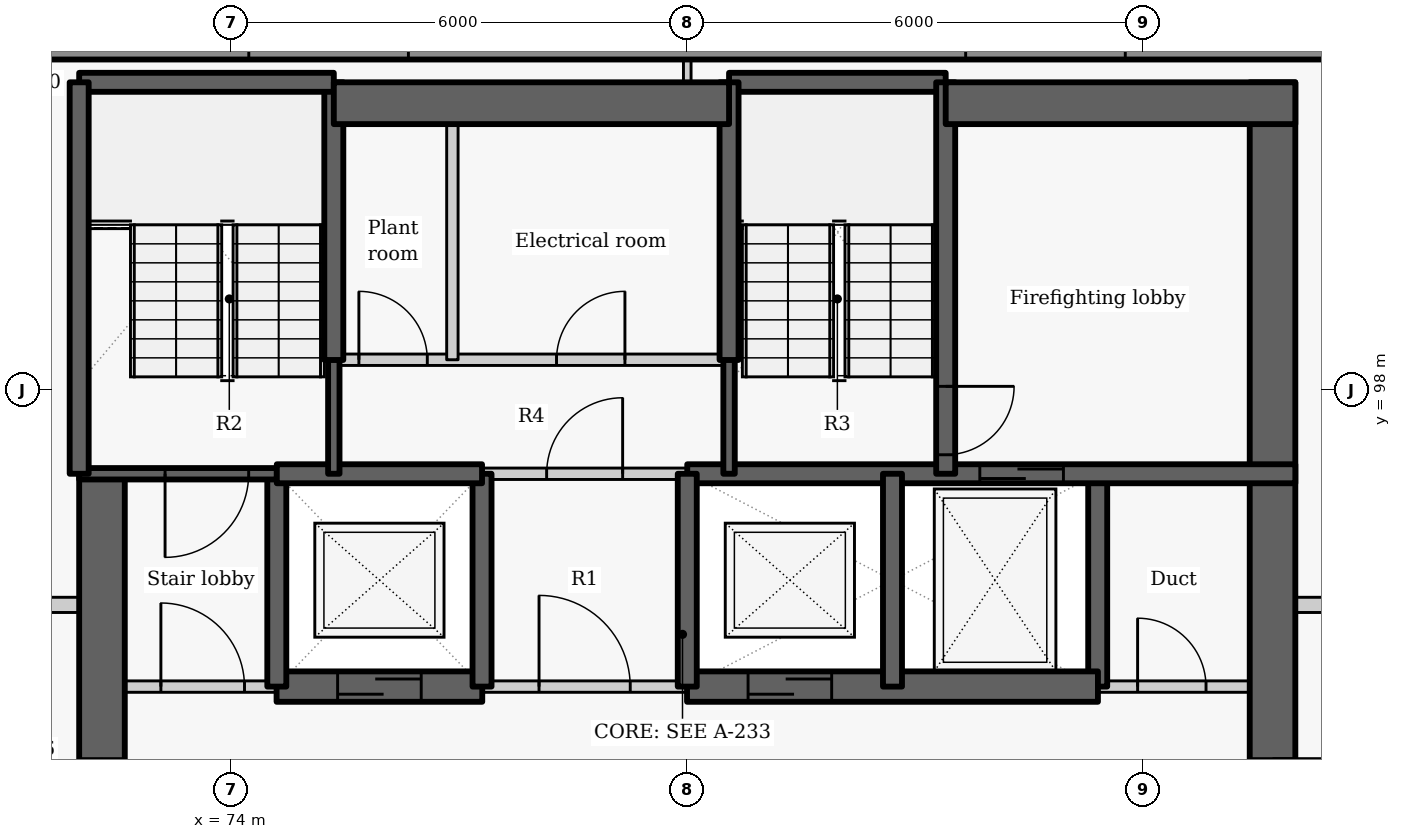
"""IFC4 building model, lengths in metres.
Left out: names, types, materials, properties, quantities, classifications, styles, units other than length and angle.
Written with IfcOpenShell. Run it as: python <this file> out.ifc"""

import sys

from ifc_helpers import new_model, si_unit, direction, frame, frame_2d, origin, place, context, subcontext, project, spatial, rectangle, extrude, element, fill, save


model = new_model("IFC4")
c1 = context("Model", 3, precision=1e-05, world=origin(), true_north=direction((0.0, 1.0)))
c2 = subcontext(c1, "Body", "Model", "MODEL_VIEW")
j1 = project(units=[si_unit("LENGTHUNIT", "METRE"), si_unit("PLANEANGLEUNIT", "RADIAN")], contexts=[c1])
p1 = place(None, origin())
s1 = spatial("IfcSite", under=j1, at=p1, CompositionType="ELEMENT")
p2 = place(p1, origin())
s2 = spatial("IfcBuilding", under=s1, at=p2, CompositionType="ELEMENT")
p3 = place(p2, frame((0.0, 0.0, 183.3)))
s3 = spatial("IfcBuildingStorey", under=s2, at=p3, CompositionType="ELEMENT", Elevation=183.3)
p4 = place(p3, frame((89.449, 102.5, 0.0), z_axis=(0.0, 0.0, 1.0), x_axis=(-1.0, 0.0, 0.0)))
e1 = element("IfcWall", 1, at=p4, inside=s3, PredefinedType="SOLIDWALL", context=c2, shape_type="SweptSolid", body=[
    extrude(rectangle(XDim=18.933, YDim=0.3, at=frame_2d((9.466, 0.0))), origin(), (0.0, 0.0, 1.0), 2.425),
])
p5 = place(p4, frame((3.687, 0.0, 0.9)))
e2 = element("IfcOpeningElement", 2, at=p5, cuts=e1, PredefinedType="OPENING", context=c2, shape_type="SweptSolid", body=[
    extrude(rectangle(XDim=2.1, YDim=1.1, at=frame_2d((1.05, 0.55))), frame((0.0, 0.16, 0.0), z_axis=(0.0, -1.0, 0.0), x_axis=(1.0, 0.0, 0.0)), (0.0, 0.0, 1.0), 0.32),
])
p6 = place(p4, frame((13.118, 0.0, 0.9)))
e3 = element("IfcOpeningElement", 3, at=p6, cuts=e1, PredefinedType="OPENING", context=c2, shape_type="SweptSolid", body=[
    extrude(rectangle(XDim=2.1, YDim=1.1, at=frame_2d((1.05, 0.55))), frame((0.0, 0.16, 0.0), z_axis=(0.0, -1.0, 0.0), x_axis=(1.0, 0.0, 0.0)), (0.0, 0.0, 1.0), 0.32),
])
p7 = place(p3, frame((72.3, 87.8, -0.275), z_axis=(0.0, 0.0, 1.0), x_axis=(0.0, 1.0, 0.0)))
e4 = element("IfcWall", 4, at=p7, inside=s3, PredefinedType="SHEAR", context=c2, shape_type="SweptSolid", body=[
    extrude(rectangle(XDim=9.1, YDim=0.6, at=frame_2d((4.55, 0.0))), origin(), (0.0, 0.0, 1.0), 3.3),
])
p8 = place(p7, frame((3.852, 0.0, 0.275)))
e5 = element("IfcOpeningElement", 5, at=p8, cuts=e4, PredefinedType="OPENING", context=c2, shape_type="SweptSolid", body=[
    extrude(rectangle(XDim=1.5, YDim=2.1, at=frame_2d((0.75, 1.05))), frame((0.0, 0.31, 0.0), z_axis=(0.0, -1.0, 0.0), x_axis=(1.0, 0.0, 0.0)), (0.0, 0.0, 1.0), 0.62),
])
p9 = place(p3, frame((85.4, 94.1, -0.275), z_axis=(0.0, 0.0, 1.0), x_axis=(0.0, 1.0, 0.0)))
e6 = element("IfcWall", 6, at=p9, inside=s3, PredefinedType="SHEAR", context=c2, shape_type="SweptSolid", body=[
    extrude(rectangle(XDim=2.8, YDim=0.25, at=frame_2d((1.4, 0.0))), origin(), (0.0, 0.0, 1.0), 3.3),
])
p10 = place(p3, frame((87.7, 102.05, -0.275), z_axis=(0.0, 0.0, 1.0), x_axis=(0.0, -1.0, 0.0)))
e7 = element("IfcWall", 7, at=p10, inside=s3, PredefinedType="SHEAR", context=c2, shape_type="SweptSolid", body=[
    extrude(rectangle(XDim=14.25, YDim=0.6, at=frame_2d((7.125, 0.0))), origin(), (0.0, 0.0, 1.0), 3.3),
])
p11 = place(p10, frame((8.898, 0.0, 0.275)))
e8 = element("IfcOpeningElement", 8, at=p11, cuts=e7, PredefinedType="OPENING", context=c2, shape_type="SweptSolid", body=[
    extrude(rectangle(XDim=1.5, YDim=2.1, at=frame_2d((0.75, 1.05))), frame((0.0, 0.31, 0.0), z_axis=(0.0, -1.0, 0.0), x_axis=(1.0, 0.0, 0.0)), (0.0, 0.0, 1.0), 0.62),
])
p12 = place(p3, frame((72.0, 94.1, 0.0), z_axis=(0.0, 0.0, 1.0), x_axis=(1.0, 0.0, 0.0)))
e9 = element("IfcWall", 9, at=p12, inside=s3, PredefinedType="PARTITIONING", context=c2, shape_type="SweptSolid", body=[
    extrude(rectangle(XDim=2.603, YDim=0.15, at=frame_2d((1.302, 0.0))), origin(), (0.0, 0.0, 1.0), 3.025),
])
p13 = place(p12, frame((1.075, 0.0, 0.0)))
e10 = element("IfcOpeningElement", 10, at=p13, cuts=e9, PredefinedType="OPENING", context=c2, shape_type="SweptSolid", body=[
    extrude(rectangle(XDim=1.1, YDim=2.1, at=frame_2d((0.55, 1.05))), frame((0.0, 0.085, 0.0), z_axis=(0.0, -1.0, 0.0), x_axis=(1.0, 0.0, 0.0)), (0.0, 0.0, 1.0), 0.17),
])
p14 = place(p3, frame((77.297, 94.1, 0.0), z_axis=(0.0, 0.0, 1.0), x_axis=(1.0, 0.0, 0.0)))
e11 = element("IfcWall", 11, at=p14, inside=s3, PredefinedType="PARTITIONING", context=c2, shape_type="SweptSolid", body=[
    extrude(rectangle(XDim=2.706, YDim=0.15, at=frame_2d((1.353, 0.0))), origin(), (0.0, 0.0, 1.0), 3.025),
])
p15 = place(p14, frame((0.753, 0.0, 0.0)))
e12 = element("IfcOpeningElement", 12, at=p15, cuts=e11, PredefinedType="OPENING", context=c2, shape_type="SweptSolid", body=[
    extrude(rectangle(XDim=1.2, YDim=2.1, at=frame_2d((0.6, 1.05))), frame((0.0, 0.085, 0.0), z_axis=(0.0, -1.0, 0.0), x_axis=(1.0, 0.0, 0.0)), (0.0, 0.0, 1.0), 0.17),
])
p16 = place(p3, frame((85.397, 94.1, 0.0), z_axis=(0.0, 0.0, 1.0), x_axis=(1.0, 0.0, 0.0)))
e13 = element("IfcWall", 13, at=p16, inside=s3, PredefinedType="PARTITIONING", context=c2, shape_type="SweptSolid", body=[
    extrude(rectangle(XDim=2.603, YDim=0.15, at=frame_2d((1.302, 0.0))), origin(), (0.0, 0.0, 1.0), 3.025),
])
p17 = place(p16, frame((0.528, 0.0, 0.0)))
e14 = element("IfcOpeningElement", 14, at=p17, cuts=e13, PredefinedType="OPENING", context=c2, shape_type="SweptSolid", body=[
    extrude(rectangle(XDim=0.9, YDim=2.1, at=frame_2d((0.45, 1.05))), frame((0.0, 0.085, 0.0), z_axis=(0.0, -1.0, 0.0), x_axis=(1.0, 0.0, 0.0)), (0.0, 0.0, 1.0), 0.17),
])
p18 = place(p3, frame((74.597, 94.1, -0.275), z_axis=(0.0, 0.0, 1.0), x_axis=(1.0, 0.0, 0.0)))
e15 = element("IfcWall", 15, at=p18, inside=s3, PredefinedType="SHEAR", context=c2, shape_type="SweptSolid", body=[
    extrude(rectangle(XDim=2.706, YDim=0.4, at=frame_2d((1.353, 0.0))), origin(), (0.0, 0.0, 1.0), 3.3),
])
p19 = place(p18, frame((0.803, 0.0, 0.275)))
e16 = element("IfcOpeningElement", 16, at=p19, cuts=e15, PredefinedType="OPENING", context=c2, shape_type="SweptSolid", body=[
    extrude(rectangle(XDim=1.1, YDim=2.1, at=frame_2d((0.55, 1.05))), frame((0.0, 0.21, 0.0), z_axis=(0.0, -1.0, 0.0), x_axis=(1.0, 0.0, 0.0)), (0.0, 0.0, 1.0), 0.42),
])
p20 = place(p3, frame((79.997, 94.1, -0.275), z_axis=(0.0, 0.0, 1.0), x_axis=(1.0, 0.0, 0.0)))
e17 = element("IfcWall", 17, at=p20, inside=s3, PredefinedType="SHEAR", context=c2, shape_type="SweptSolid", body=[
    extrude(rectangle(XDim=5.406, YDim=0.4, at=frame_2d((2.703, 0.0))), origin(), (0.0, 0.0, 1.0), 3.3),
])
p21 = place(p20, frame((0.803, 0.0, 0.275)))
e18 = element("IfcOpeningElement", 18, at=p21, cuts=e17, PredefinedType="OPENING", context=c2, shape_type="SweptSolid", body=[
    extrude(rectangle(XDim=1.1, YDim=2.1, at=frame_2d((0.55, 1.05))), frame((0.0, 0.21, 0.0), z_axis=(0.0, -1.0, 0.0), x_axis=(1.0, 0.0, 0.0)), (0.0, 0.0, 1.0), 0.42),
])
p22 = place(p3, frame((74.6, 94.1, -0.275), z_axis=(0.0, 0.0, 1.0), x_axis=(0.0, 1.0, 0.0)))
e19 = element("IfcWall", 19, at=p22, inside=s3, PredefinedType="SHEAR", context=c2, shape_type="SweptSolid", body=[
    extrude(rectangle(XDim=2.8, YDim=0.25, at=frame_2d((1.4, 0.0))), origin(), (0.0, 0.0, 1.0), 3.3),
])
p23 = place(p3, frame((74.6, 96.9, -0.275), z_axis=(0.0, 0.0, 1.0), x_axis=(-1.0, 0.0, 0.0)))
e20 = element("IfcWall", 20, at=p23, inside=s3, PredefinedType="SHEAR", context=c2, shape_type="SweptSolid", body=[
    extrude(rectangle(XDim=2.6, YDim=0.15, at=frame_2d((1.3, 0.0))), origin(), (0.0, 0.0, 1.0), 3.3),
])
p24 = place(p23, frame((0.37, 0.0, 0.275)))
e21 = element("IfcOpeningElement", 21, at=p24, cuts=e20, PredefinedType="OPENING", context=c2, shape_type="SweptSolid", body=[
    extrude(rectangle(XDim=1.1, YDim=2.1, at=frame_2d((0.55, 1.05))), frame((0.0, 0.085, 0.0), z_axis=(0.0, -1.0, 0.0), x_axis=(1.0, 0.0, 0.0)), (0.0, 0.0, 1.0), 0.17),
])
p25 = place(p3, frame((77.3, 94.1, -0.275), z_axis=(0.0, 0.0, 1.0), x_axis=(0.0, 1.0, 0.0)))
e22 = element("IfcWall", 22, at=p25, inside=s3, PredefinedType="SHEAR", context=c2, shape_type="SweptSolid", body=[
    extrude(rectangle(XDim=2.8, YDim=0.25, at=frame_2d((1.4, 0.0))), origin(), (0.0, 0.0, 1.0), 3.3),
])
p26 = place(p3, frame((74.6, 96.9, -0.275), z_axis=(0.0, 0.0, 1.0), x_axis=(1.0, 0.0, 0.0)))
e23 = element("IfcWall", 23, at=p26, inside=s3, PredefinedType="SHEAR", context=c2, shape_type="SweptSolid", body=[
    extrude(rectangle(XDim=2.7, YDim=0.25, at=frame_2d((1.35, 0.0))), origin(), (0.0, 0.0, 1.0), 3.3),
])
p27 = place(p3, frame((80.0, 96.9, -0.275), z_axis=(0.0, 0.0, 1.0), x_axis=(1.0, 0.0, 0.0)))
e24 = element("IfcWall", 24, at=p27, inside=s3, PredefinedType="SHEAR", context=c2, shape_type="SweptSolid", body=[
    extrude(rectangle(XDim=8.0, YDim=0.25, at=frame_2d((4.0, 0.0))), origin(), (0.0, 0.0, 1.0), 3.3),
])
p28 = place(p27, frame((3.849, 0.0, 0.275)))
e25 = element("IfcOpeningElement", 25, at=p28, cuts=e24, PredefinedType="OPENING", context=c2, shape_type="SweptSolid", body=[
    extrude(rectangle(XDim=1.1, YDim=2.1, at=frame_2d((0.55, 1.05))), frame((0.0, 0.135, 0.0), z_axis=(0.0, -1.0, 0.0), x_axis=(1.0, 0.0, 0.0)), (0.0, 0.0, 1.0), 0.27),
])
p29 = place(p3, frame((80.0, 94.1, -0.275), z_axis=(0.0, 0.0, 1.0), x_axis=(0.0, 1.0, 0.0)))
e26 = element("IfcWall", 26, at=p29, inside=s3, PredefinedType="SHEAR", context=c2, shape_type="SweptSolid", body=[
    extrude(rectangle(XDim=2.8, YDim=0.25, at=frame_2d((1.4, 0.0))), origin(), (0.0, 0.0, 1.0), 3.3),
])
p30 = place(p3, frame((77.3, 96.9, 0.0), z_axis=(0.0, 0.0, 1.0), x_axis=(1.0, 0.0, 0.0)))
e27 = element("IfcWall", 27, at=p30, inside=s3, PredefinedType="PARTITIONING", context=c2, shape_type="SweptSolid", body=[
    extrude(rectangle(XDim=2.7, YDim=0.15, at=frame_2d((1.35, 0.0))), origin(), (0.0, 0.0, 1.0), 3.025),
])
p31 = place(p30, frame((0.85, 0.0, 0.0)))
e28 = element("IfcOpeningElement", 28, at=p31, cuts=e27, PredefinedType="OPENING", context=c2, shape_type="SweptSolid", body=[
    extrude(rectangle(XDim=1.0, YDim=2.1, at=frame_2d((0.5, 1.05))), frame((0.0, 0.085, 0.0), z_axis=(0.0, -1.0, 0.0), x_axis=(1.0, 0.0, 0.0)), (0.0, 0.0, 1.0), 0.17),
])
p32 = place(p3, frame((82.7, 94.1, -0.275), z_axis=(0.0, 0.0, 1.0), x_axis=(0.0, 1.0, 0.0)))
e29 = element("IfcWall", 29, at=p32, inside=s3, PredefinedType="SHEAR", context=c2, shape_type="SweptSolid", body=[
    extrude(rectangle(XDim=2.8, YDim=0.25, at=frame_2d((1.4, 0.0))), origin(), (0.0, 0.0, 1.0), 3.3),
])
p33 = place(p3, frame((75.35, 96.9, -0.275), z_axis=(0.0, 0.0, 1.0), x_axis=(0.0, 1.0, 0.0)))
e30 = element("IfcWall", 30, at=p33, inside=s3, PredefinedType="SHEAR", context=c2, shape_type="SweptSolid", body=[
    extrude(rectangle(XDim=1.503, YDim=0.15, at=frame_2d((0.751, 0.0))), origin(), (0.0, 0.0, 1.0), 3.3),
])
p34 = place(p3, frame((75.35, 98.397, -0.275), z_axis=(0.0, 0.0, 1.0), x_axis=(0.0, 1.0, 0.0)))
e31 = element("IfcWall", 31, at=p34, inside=s3, PredefinedType="SHEAR", context=c2, shape_type="SweptSolid", body=[
    extrude(rectangle(XDim=3.653, YDim=0.25, at=frame_2d((1.827, 0.0))), origin(), (0.0, 0.0, 1.0), 3.3),
])
p35 = place(p3, frame((72.0, 102.05, -0.275), z_axis=(0.0, 0.0, 1.0), x_axis=(1.0, 0.0, 0.0)))
e32 = element("IfcWall", 32, at=p35, inside=s3, PredefinedType="SHEAR", context=c2, shape_type="SweptSolid", body=[
    extrude(rectangle(XDim=3.35, YDim=0.25, at=frame_2d((1.675, 0.0))), origin(), (0.0, 0.0, 1.0), 3.3),
])
p36 = place(p3, frame((80.55, 102.05, -0.275), z_axis=(0.0, 0.0, 1.0), x_axis=(1.0, 0.0, 0.0)))
e33 = element("IfcWall", 33, at=p36, inside=s3, PredefinedType="SHEAR", context=c2, shape_type="SweptSolid", body=[
    extrude(rectangle(XDim=2.85, YDim=0.25, at=frame_2d((1.425, 0.0))), origin(), (0.0, 0.0, 1.0), 3.3),
])
p37 = place(p3, frame((72.0, 96.9, -0.275), z_axis=(0.0, 0.0, 1.0), x_axis=(0.0, 1.0, 0.0)))
e34 = element("IfcWall", 34, at=p37, inside=s3, PredefinedType="SHEAR", context=c2, shape_type="SweptSolid", body=[
    extrude(rectangle(XDim=5.15, YDim=0.25, at=frame_2d((2.575, 0.0))), origin(), (0.0, 0.0, 1.0), 3.3),
])
p38 = place(p3, frame((83.4, 102.05, -0.275), z_axis=(0.0, 0.0, 1.0), x_axis=(0.0, -1.0, 0.0)))
e35 = element("IfcWall", 35, at=p38, inside=s3, PredefinedType="SHEAR", context=c2, shape_type="SweptSolid", body=[
    extrude(rectangle(XDim=5.15, YDim=0.25, at=frame_2d((2.575, 0.0))), origin(), (0.0, 0.0, 1.0), 3.3),
])
p39 = place(p38, frame((4.0, 0.0, 0.275)))
e36 = element("IfcOpeningElement", 36, at=p39, cuts=e35, PredefinedType="OPENING", context=c2, shape_type="SweptSolid", body=[
    extrude(rectangle(XDim=0.9, YDim=2.1, at=frame_2d((0.45, 1.05))), frame((0.0, 0.135, 0.0), z_axis=(0.0, -1.0, 0.0), x_axis=(1.0, 0.0, 0.0)), (0.0, 0.0, 1.0), 0.27),
])
p40 = place(p3, frame((80.55, 96.9, -0.275), z_axis=(0.0, 0.0, 1.0), x_axis=(0.0, 1.0, 0.0)))
e37 = element("IfcWall", 37, at=p40, inside=s3, PredefinedType="SHEAR", context=c2, shape_type="SweptSolid", body=[
    extrude(rectangle(XDim=1.503, YDim=0.15, at=frame_2d((0.751, 0.0))), origin(), (0.0, 0.0, 1.0), 3.3),
])
p41 = place(p3, frame((80.55, 98.397, -0.275), z_axis=(0.0, 0.0, 1.0), x_axis=(0.0, 1.0, 0.0)))
e38 = element("IfcWall", 38, at=p41, inside=s3, PredefinedType="SHEAR", context=c2, shape_type="SweptSolid", body=[
    extrude(rectangle(XDim=3.653, YDim=0.25, at=frame_2d((1.827, 0.0))), origin(), (0.0, 0.0, 1.0), 3.3),
])
p42 = place(p3, frame((75.35, 101.775, -0.275), z_axis=(0.0, 0.0, 1.0), x_axis=(1.0, 0.0, 0.0)))
e39 = element("IfcWall", 39, at=p42, inside=s3, PredefinedType="SHEAR", context=c2, shape_type="SweptSolid", body=[
    extrude(rectangle(XDim=5.2, YDim=0.55, at=frame_2d((2.6, 0.0))), origin(), (0.0, 0.0, 1.0), 3.3),
])
p43 = place(p3, frame((83.4, 101.775, -0.275), z_axis=(0.0, 0.0, 1.0), x_axis=(1.0, 0.0, 0.0)))
e40 = element("IfcWall", 40, at=p43, inside=s3, PredefinedType="SHEAR", context=c2, shape_type="SweptSolid", body=[
    extrude(rectangle(XDim=4.6, YDim=0.55, at=frame_2d((2.3, 0.0))), origin(), (0.0, 0.0, 1.0), 3.3),
])
p44 = place(p3, frame((75.35, 98.4, 0.0), z_axis=(0.0, 0.0, 1.0), x_axis=(1.0, 0.0, 0.0)))
e41 = element("IfcWall", 41, at=p44, inside=s3, PredefinedType="PARTITIONING", context=c2, shape_type="SweptSolid", body=[
    extrude(rectangle(XDim=5.2, YDim=0.15, at=frame_2d((2.6, 0.0))), origin(), (0.0, 0.0, 1.0), 3.025),
])
p45 = place(p44, frame((0.33, 0.0, 0.0)))
e42 = element("IfcOpeningElement", 42, at=p45, cuts=e41, PredefinedType="OPENING", context=c2, shape_type="SweptSolid", body=[
    extrude(rectangle(XDim=0.9, YDim=2.1, at=frame_2d((0.45, 1.05))), frame((0.0, 0.085, 0.0), z_axis=(0.0, -1.0, 0.0), x_axis=(1.0, 0.0, 0.0)), (0.0, 0.0, 1.0), 0.17),
])
p46 = place(p44, frame((2.93, 0.0, 0.0)))
e43 = element("IfcOpeningElement", 43, at=p46, cuts=e41, PredefinedType="OPENING", context=c2, shape_type="SweptSolid", body=[
    extrude(rectangle(XDim=0.9, YDim=2.1, at=frame_2d((0.45, 1.05))), frame((0.0, 0.085, 0.0), z_axis=(0.0, -1.0, 0.0), x_axis=(1.0, 0.0, 0.0)), (0.0, 0.0, 1.0), 0.17),
])
p47 = place(p3, frame((76.91, 98.4, 0.0), z_axis=(0.0, 0.0, 1.0), x_axis=(0.0, 1.0, 0.0)))
e44 = element("IfcWall", 44, at=p47, inside=s3, PredefinedType="PARTITIONING", context=c2, shape_type="SweptSolid", body=[
    extrude(rectangle(XDim=3.65, YDim=0.15, at=frame_2d((1.825, 0.0))), origin(), (0.0, 0.0, 1.0), 3.025),
])
p48 = place(p3, frame((69.587, 95.175, 0.0), z_axis=(0.0, 0.0, 1.0), x_axis=(1.0, 0.0, 0.0)))
e45 = element("IfcWall", 45, at=p48, inside=s3, PredefinedType="PARTITIONING", context=c2, shape_type="SweptSolid", body=[
    extrude(rectangle(XDim=2.413, YDim=0.2, at=frame_2d((1.207, 0.0))), origin(), (0.0, 0.0, 1.0), 2.505),
])
p49 = place(p3, frame((88.0, 95.175, 0.0), z_axis=(0.0, 0.0, 1.0), x_axis=(1.0, 0.0, 0.0)))
e46 = element("IfcWall", 46, at=p49, inside=s3, PredefinedType="PARTITIONING", context=c2, shape_type="SweptSolid", body=[
    extrude(rectangle(XDim=1.473, YDim=0.2, at=frame_2d((0.736, 0.0))), origin(), (0.0, 0.0, 1.0), 3.025),
])
p50 = place(p3, frame((80.0, 102.05, 0.0), z_axis=(0.0, 0.0, 1.0), x_axis=(0.0, 1.0, 0.0)))
e47 = element("IfcWall", 47, at=p50, inside=s3, PredefinedType="PARTITIONING", context=c2, shape_type="SweptSolid", body=[
    extrude(rectangle(XDim=0.3, YDim=0.1, at=frame_2d((0.15, 0.0))), origin(), (0.0, 0.0, 1.0), 3.025),
])
p51 = place(p13, origin())
e48 = element("IfcDoor", 48, at=p51, inside=s3, OperationType="SINGLE_SWING_LEFT", PredefinedType="DOOR", context=c2, shape_type="SweptSolid", body=[
    extrude(rectangle(XDim=1.1, YDim=2.1, at=frame_2d((0.55, 1.05))), frame((0.0, 0.025, 0.0), z_axis=(0.0, -1.0, 0.0), x_axis=(1.0, 0.0, 0.0)), (0.0, 0.0, 1.0), 0.05),
])
fill(e10, e48)
p52 = place(p19, origin())
e49 = element("IfcDoor", 49, at=p52, inside=s3, OperationType="SLIDING_TO_LEFT", PredefinedType="DOOR", context=c2, shape_type="SweptSolid", body=[
    extrude(rectangle(XDim=1.1, YDim=2.1, at=frame_2d((0.55, 1.05))), frame((0.0, 0.025, 0.0), z_axis=(0.0, -1.0, 0.0), x_axis=(1.0, 0.0, 0.0)), (0.0, 0.0, 1.0), 0.05),
])
fill(e16, e49)
p53 = place(p15, origin())
e50 = element("IfcDoor", 50, at=p53, inside=s3, OperationType="DOUBLE_DOOR_SINGLE_SWING", PredefinedType="DOOR", context=c2, shape_type="SweptSolid", body=[
    extrude(rectangle(XDim=1.2, YDim=2.1, at=frame_2d((0.6, 1.05))), frame((0.0, 0.025, 0.0), z_axis=(0.0, -1.0, 0.0), x_axis=(1.0, 0.0, 0.0)), (0.0, 0.0, 1.0), 0.05),
])
fill(e12, e50)
p54 = place(p21, origin())
e51 = element("IfcDoor", 51, at=p54, inside=s3, OperationType="SLIDING_TO_LEFT", PredefinedType="DOOR", context=c2, shape_type="SweptSolid", body=[
    extrude(rectangle(XDim=1.1, YDim=2.1, at=frame_2d((0.55, 1.05))), frame((0.0, 0.025, 0.0), z_axis=(0.0, -1.0, 0.0), x_axis=(1.0, 0.0, 0.0)), (0.0, 0.0, 1.0), 0.05),
])
fill(e18, e51)
p55 = place(p28, origin())
e52 = element("IfcDoor", 52, at=p55, inside=s3, OperationType="SLIDING_TO_LEFT", PredefinedType="DOOR", context=c2, shape_type="SweptSolid", body=[
    extrude(rectangle(XDim=1.1, YDim=2.1, at=frame_2d((0.55, 1.05))), frame((0.0, 0.025, 0.0), z_axis=(0.0, -1.0, 0.0), x_axis=(1.0, 0.0, 0.0)), (0.0, 0.0, 1.0), 0.05),
])
fill(e25, e52)
p56 = place(p17, origin())
e53 = element("IfcDoor", 53, at=p56, inside=s3, OperationType="SINGLE_SWING_LEFT", PredefinedType="DOOR", context=c2, shape_type="SweptSolid", body=[
    extrude(rectangle(XDim=0.9, YDim=2.1, at=frame_2d((0.45, 1.05))), frame((0.0, 0.025, 0.0), z_axis=(0.0, -1.0, 0.0), x_axis=(1.0, 0.0, 0.0)), (0.0, 0.0, 1.0), 0.05),
])
fill(e14, e53)
p57 = place(p31, origin())
e54 = element("IfcDoor", 54, at=p57, inside=s3, OperationType="SINGLE_SWING_RIGHT", PredefinedType="DOOR", context=c2, shape_type="SweptSolid", body=[
    extrude(rectangle(XDim=1.0, YDim=2.1, at=frame_2d((0.5, 1.05))), frame((0.0, 0.025, 0.0), z_axis=(0.0, -1.0, 0.0), x_axis=(1.0, 0.0, 0.0)), (0.0, 0.0, 1.0), 0.05),
])
fill(e28, e54)
p58 = place(p45, origin())
e55 = element("IfcDoor", 55, at=p58, inside=s3, OperationType="SINGLE_SWING_LEFT", PredefinedType="DOOR", context=c2, shape_type="SweptSolid", body=[
    extrude(rectangle(XDim=0.9, YDim=2.1, at=frame_2d((0.45, 1.05))), frame((0.0, 0.025, 0.0), z_axis=(0.0, -1.0, 0.0), x_axis=(1.0, 0.0, 0.0)), (0.0, 0.0, 1.0), 0.05),
])
fill(e42, e55)
p59 = place(p46, origin())
e56 = element("IfcDoor", 56, at=p59, inside=s3, OperationType="SINGLE_SWING_RIGHT", PredefinedType="DOOR", context=c2, shape_type="SweptSolid", body=[
    extrude(rectangle(XDim=0.9, YDim=2.1, at=frame_2d((0.45, 1.05))), frame((0.0, 0.025, 0.0), z_axis=(0.0, -1.0, 0.0), x_axis=(1.0, 0.0, 0.0)), (0.0, 0.0, 1.0), 0.05),
])
fill(e43, e56)
p60 = place(p24, origin())
e57 = element("IfcDoor", 57, at=p60, inside=s3, OperationType="SINGLE_SWING_RIGHT", PredefinedType="DOOR", context=c2, shape_type="SweptSolid", body=[
    extrude(rectangle(XDim=1.1, YDim=2.1, at=frame_2d((0.55, 1.05))), frame((0.0, 0.025, 0.0), z_axis=(0.0, -1.0, 0.0), x_axis=(1.0, 0.0, 0.0)), (0.0, 0.0, 1.0), 0.05),
])
fill(e21, e57)
p61 = place(p39, origin())
e58 = element("IfcDoor", 58, at=p61, inside=s3, OperationType="SINGLE_SWING_LEFT", PredefinedType="DOOR", context=c2, shape_type="SweptSolid", body=[
    extrude(rectangle(XDim=0.9, YDim=2.1, at=frame_2d((0.45, 1.05))), frame((0.0, 0.025, 0.0), z_axis=(0.0, -1.0, 0.0), x_axis=(1.0, 0.0, 0.0)), (0.0, 0.0, 1.0), 0.05),
])
fill(e36, e58)
p62 = place(p11, origin())
e59 = element("IfcDoor", 59, at=p62, inside=s3, OperationType="DOUBLE_DOOR_SINGLE_SWING", PredefinedType="DOOR", context=c2, shape_type="SweptSolid", body=[
    extrude(rectangle(XDim=1.5, YDim=2.1, at=frame_2d((0.75, 1.05))), frame((0.0, 0.025, 0.0), z_axis=(0.0, -1.0, 0.0), x_axis=(1.0, 0.0, 0.0)), (0.0, 0.0, 1.0), 0.05),
])
fill(e8, e59)
p63 = place(p8, origin())
e60 = element("IfcDoor", 60, at=p63, inside=s3, OperationType="DOUBLE_DOOR_SINGLE_SWING", PredefinedType="DOOR", context=c2, shape_type="SweptSolid", body=[
    extrude(rectangle(XDim=1.5, YDim=2.1, at=frame_2d((0.75, 1.05))), frame((0.0, 0.025, 0.0), z_axis=(0.0, -1.0, 0.0), x_axis=(1.0, 0.0, 0.0)), (0.0, 0.0, 1.0), 0.05),
])
fill(e5, e60)
save(model, sys.argv[1])
